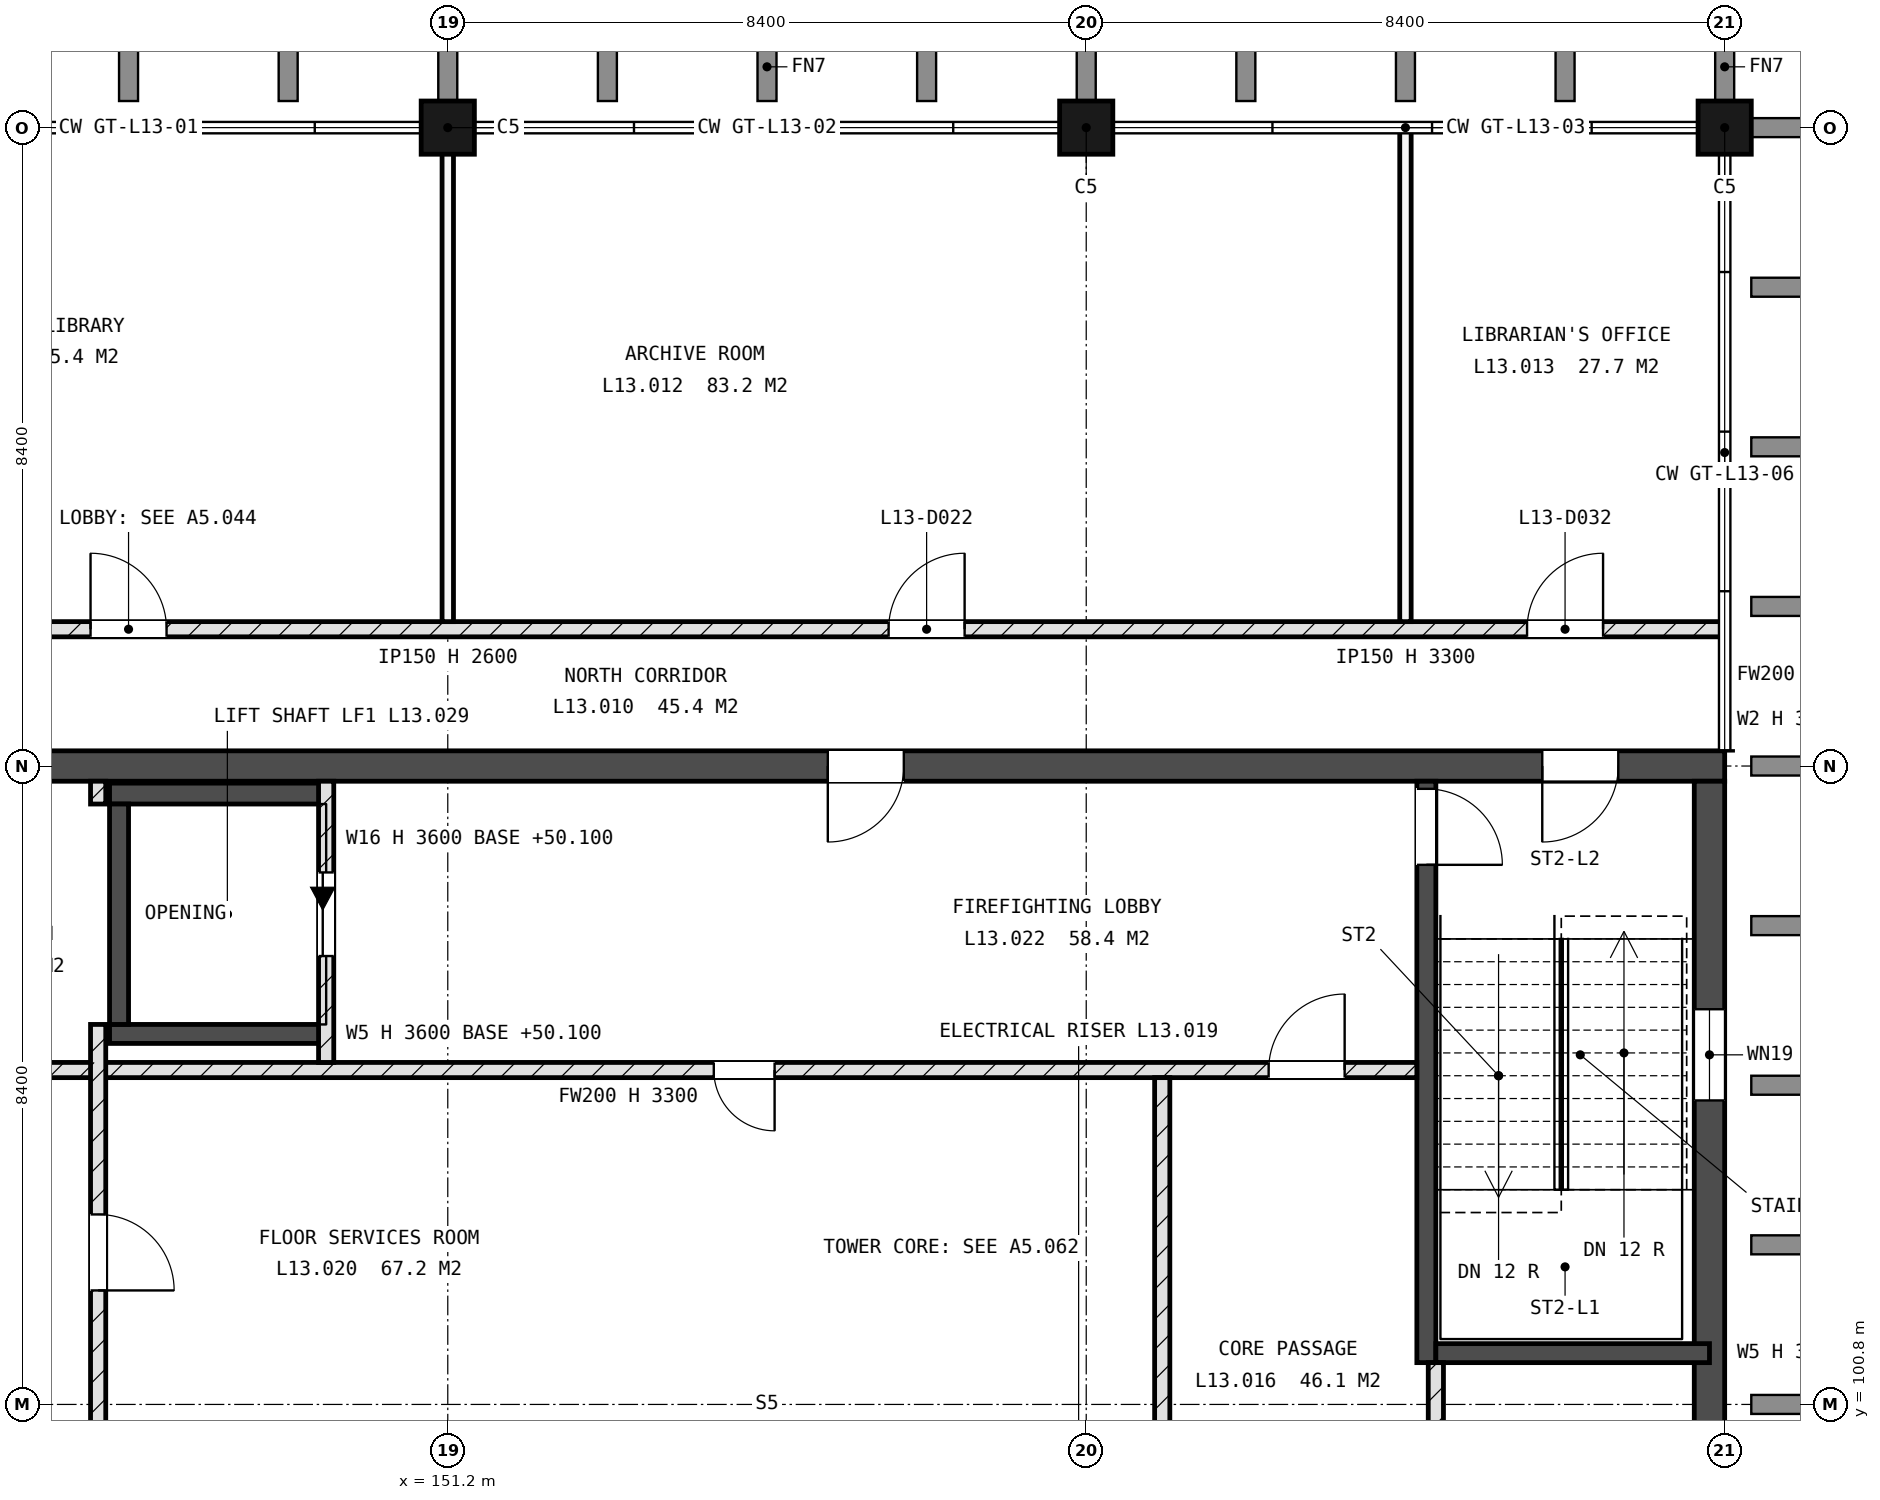
"""IFC4 building model, lengths in metres.
Left out: names, types, materials, properties, quantities, classifications, styles, units other than length and angle.
Written with IfcOpenShell. Run it as: python <this file> out.ifc"""

import sys

from ifc_helpers import new_model, si_unit, direction, frame, frame_2d, origin, origin_2d, place, context, subcontext, project, spatial, rectangle, extrude, element, fill, save


model = new_model("IFC4")
c1 = context("Model", 3, precision=1e-05, world=origin(), true_north=direction((0.0, 1.0)))
c2 = subcontext(c1, "Body", "Model", "MODEL_VIEW")
j1 = project(units=[si_unit("LENGTHUNIT", "METRE"), si_unit("PLANEANGLEUNIT", "RADIAN")], contexts=[c1])
p1 = place(None, origin())
s1 = spatial("IfcSite", under=j1, at=p1, CompositionType="ELEMENT")
p2 = place(p1, origin())
s2 = spatial("IfcBuilding", under=s1, at=p2, CompositionType="ELEMENT")
p3 = place(p2, frame((0.0, 0.0, 50.4)))
s3 = spatial("IfcBuildingStorey", under=s2, at=p3, CompositionType="ELEMENT", Elevation=50.4)
for number, where, z_axis, x_axis in (
    (1, (151.2, 117.6, -0.3), (0.0, 0.0, 1.0), (1.0, 0.0, 0.0)),
    (2, (159.6, 117.6, -0.3), (0.0, 0.0, 1.0), (1.0, 0.0, 0.0)),
    (3, (168.0, 117.6, -0.3), (0.0, 0.0, 1.0), (1.0, 0.0, 0.0)),
):
    element("IfcColumn", number, at=place(p3, frame(where, z_axis=z_axis, x_axis=x_axis)), inside=s3, PredefinedType="COLUMN", context=c2, shape_type="SweptSolid", body=[
        extrude(rectangle(XDim=0.7, YDim=0.7, at=origin_2d()), origin(), (0.0, 0.0, 1.0), 3.6),
    ])
p4 = place(p3, frame((142.8, 109.2, -0.3), z_axis=(0.0, 0.0, 1.0), x_axis=(1.0, 0.0, 0.0)))
e4 = element("IfcWall", 4, at=p4, inside=s3, PredefinedType="SHEAR", context=c2, shape_type="SweptSolid", body=[
    extrude(rectangle(XDim=25.2, YDim=0.4, at=frame_2d((12.6, 0.0))), origin(), (0.0, 0.0, 1.0), 3.6),
])
p5 = place(p4, frame((22.8, 0.0, 0.3)))
e5 = element("IfcOpeningElement", 5, at=p5, cuts=e4, PredefinedType="OPENING", context=c2, shape_type="SweptSolid", body=[
    extrude(rectangle(XDim=1.0, YDim=2.1, at=frame_2d((0.5, 1.05))), frame((0.0, 0.21, 0.0), z_axis=(0.0, -1.0, 0.0), x_axis=(1.0, 0.0, 0.0)), (0.0, 0.0, 1.0), 0.42),
])
p6 = place(p4, frame((1.5, 0.0, 0.3)))
e6 = element("IfcOpeningElement", 6, at=p6, cuts=e4, PredefinedType="OPENING", context=c2, shape_type="SweptSolid", body=[
    extrude(rectangle(XDim=0.8, YDim=2.1, at=frame_2d((0.4, 1.05))), frame((0.0, 0.21, 0.0), z_axis=(0.0, -1.0, 0.0), x_axis=(1.0, 0.0, 0.0)), (0.0, 0.0, 1.0), 0.42),
])
p7 = place(p4, frame((13.4, 0.0, 0.3)))
e7 = element("IfcOpeningElement", 7, at=p7, cuts=e4, PredefinedType="OPENING", context=c2, shape_type="SweptSolid", body=[
    extrude(rectangle(XDim=1.0, YDim=2.1, at=frame_2d((0.5, 1.05))), frame((0.0, 0.21, 0.0), z_axis=(0.0, -1.0, 0.0), x_axis=(1.0, 0.0, 0.0)), (0.0, 0.0, 1.0), 0.42),
])
p8 = place(p3, frame((167.8, 92.6, -0.3), z_axis=(0.0, 0.0, 1.0), x_axis=(0.0, 1.0, 0.0)))
e8 = element("IfcWall", 8, at=p8, inside=s3, PredefinedType="SHEAR", context=c2, shape_type="SweptSolid", body=[
    extrude(rectangle(XDim=16.4, YDim=0.4, at=frame_2d((8.2, 0.0))), origin(), (0.0, 0.0, 1.0), 3.6),
])
p9 = place(p8, frame((12.2, 0.0, 1.9)))
e9 = element("IfcOpeningElement", 9, at=p9, cuts=e8, PredefinedType="OPENING", context=c2, shape_type="SweptSolid", body=[
    extrude(rectangle(XDim=1.2, YDim=0.9, at=frame_2d((0.6, 0.45))), frame((0.0, 0.21, 0.0), z_axis=(0.0, -1.0, 0.0), x_axis=(1.0, 0.0, 0.0)), (0.0, 0.0, 1.0), 0.42),
])
p10 = place(p3, frame((164.075, 101.35, -0.3), z_axis=(0.0, 0.0, 1.0), x_axis=(0.0, 1.0, 0.0)))
e10 = element("IfcWall", 10, at=p10, inside=s3, PredefinedType="SHEAR", context=c2, shape_type="SweptSolid", body=[
    extrude(rectangle(XDim=7.65, YDim=0.25, at=frame_2d((3.825, 0.0))), origin(), (0.0, 0.0, 1.0), 3.6),
])
p11 = place(p10, frame((6.55, 0.0, 0.3)))
e11 = element("IfcOpeningElement", 11, at=p11, cuts=e10, PredefinedType="OPENING", context=c2, shape_type="SweptSolid", body=[
    extrude(rectangle(XDim=1.0, YDim=2.1, at=frame_2d((0.5, 1.05))), frame((0.0, 0.135, 0.0), z_axis=(0.0, -1.0, 0.0), x_axis=(1.0, 0.0, 0.0)), (0.0, 0.0, 1.0), 0.27),
])
p12 = place(p3, frame((164.2, 101.475, -0.3), z_axis=(0.0, 0.0, 1.0), x_axis=(1.0, 0.0, 0.0)))
e12 = element("IfcWall", 12, at=p12, inside=s3, PredefinedType="SHEAR", context=c2, shape_type="SweptSolid", body=[
    extrude(rectangle(XDim=3.6, YDim=0.25, at=frame_2d((1.8, 0.0))), origin(), (0.0, 0.0, 1.0), 3.6),
])
p13 = place(p3, frame((146.75, 105.675, -0.3), z_axis=(0.0, 0.0, 1.0), x_axis=(1.0, 0.0, 0.0)))
e13 = element("IfcWall", 13, at=p13, inside=s3, PredefinedType="SHEAR", context=c2, shape_type="SweptSolid", body=[
    extrude(rectangle(XDim=2.85, YDim=0.25, at=frame_2d((1.425, 0.0))), origin(), (0.0, 0.0, 1.0), 3.6),
])
p14 = place(p3, frame((146.75, 108.837, -0.3), z_axis=(0.0, 0.0, 1.0), x_axis=(1.0, 0.0, 0.0)))
e14 = element("IfcWall", 14, at=p14, inside=s3, PredefinedType="SHEAR", context=c2, shape_type="SweptSolid", body=[
    extrude(rectangle(XDim=2.85, YDim=0.275, at=frame_2d((1.425, 0.0))), origin(), (0.0, 0.0, 1.0), 3.6),
])
p15 = place(p3, frame((146.875, 105.8, -0.3), z_axis=(0.0, 0.0, 1.0), x_axis=(0.0, 1.0, 0.0)))
e15 = element("IfcWall", 15, at=p15, inside=s3, PredefinedType="SHEAR", context=c2, shape_type="SweptSolid", body=[
    extrude(rectangle(XDim=2.9, YDim=0.25, at=frame_2d((1.45, 0.0))), origin(), (0.0, 0.0, 1.0), 3.6),
])
p16 = place(p3, frame((143.2, 105.2, 0.0), z_axis=(0.0, 0.0, 1.0), x_axis=(1.0, 0.0, 0.0)))
e16 = element("IfcWall", 16, at=p16, inside=s3, PredefinedType="SOLIDWALL", context=c2, shape_type="SweptSolid", body=[
    extrude(rectangle(XDim=20.75, YDim=0.2, at=frame_2d((10.375, 0.0))), origin(), (0.0, 0.0, 1.0), 3.3),
])
p17 = place(p16, frame((11.5, 0.0, 0.0)))
e17 = element("IfcOpeningElement", 17, at=p17, cuts=e16, PredefinedType="OPENING", context=c2, shape_type="SweptSolid", body=[
    extrude(rectangle(XDim=0.8, YDim=2.1, at=frame_2d((0.4, 1.05))), frame((0.0, 0.11, 0.0), z_axis=(0.0, -1.0, 0.0), x_axis=(1.0, 0.0, 0.0)), (0.0, 0.0, 1.0), 0.22),
])
p18 = place(p16, frame((18.8, 0.0, 0.0)))
e18 = element("IfcOpeningElement", 18, at=p18, cuts=e16, PredefinedType="OPENING", context=c2, shape_type="SweptSolid", body=[
    extrude(rectangle(XDim=1.0, YDim=2.1, at=frame_2d((0.5, 1.05))), frame((0.0, 0.11, 0.0), z_axis=(0.0, -1.0, 0.0), x_axis=(1.0, 0.0, 0.0)), (0.0, 0.0, 1.0), 0.22),
])
p19 = place(p3, frame((142.8, 111.0, 0.0), z_axis=(0.0, 0.0, 1.0), x_axis=(1.0, 0.0, 0.0)))
e19 = element("IfcWall", 19, at=p19, inside=s3, PredefinedType="SOLIDWALL", context=c2, shape_type="SweptSolid", body=[
    extrude(rectangle(XDim=25.2, YDim=0.2, at=frame_2d((12.6, 0.0))), origin(), (0.0, 0.0, 1.0), 3.3),
])
p20 = place(p19, frame((3.7, 0.0, 0.0)))
e20 = element("IfcOpeningElement", 20, at=p20, cuts=e19, PredefinedType="OPENING", context=c2, shape_type="SweptSolid", body=[
    extrude(rectangle(XDim=1.0, YDim=2.1, at=frame_2d((0.5, 1.05))), frame((0.0, 0.11, 0.0), z_axis=(0.0, -1.0, 0.0), x_axis=(1.0, 0.0, 0.0)), (0.0, 0.0, 1.0), 0.22),
])
p21 = place(p19, frame((14.2, 0.0, 0.0)))
e21 = element("IfcOpeningElement", 21, at=p21, cuts=e19, PredefinedType="OPENING", context=c2, shape_type="SweptSolid", body=[
    extrude(rectangle(XDim=1.0, YDim=2.1, at=frame_2d((0.5, 1.05))), frame((0.0, 0.11, 0.0), z_axis=(0.0, -1.0, 0.0), x_axis=(1.0, 0.0, 0.0)), (0.0, 0.0, 1.0), 0.22),
])
p22 = place(p19, frame((22.6, 0.0, 0.0)))
e22 = element("IfcOpeningElement", 22, at=p22, cuts=e19, PredefinedType="OPENING", context=c2, shape_type="SweptSolid", body=[
    extrude(rectangle(XDim=1.0, YDim=2.1, at=frame_2d((0.5, 1.05))), frame((0.0, 0.11, 0.0), z_axis=(0.0, -1.0, 0.0), x_axis=(1.0, 0.0, 0.0)), (0.0, 0.0, 1.0), 0.22),
])
p23 = place(p3, frame((146.6, 100.5, 0.0), z_axis=(0.0, 0.0, 1.0), x_axis=(0.0, 1.0, 0.0)))
e23 = element("IfcWall", 23, at=p23, inside=s3, PredefinedType="SOLIDWALL", context=c2, shape_type="SweptSolid", body=[
    extrude(rectangle(XDim=5.3, YDim=0.2, at=frame_2d((2.65, 0.0))), origin(), (0.0, 0.0, 1.0), 3.3),
])
p24 = place(p23, frame((1.8, 0.0, 0.0)))
e24 = element("IfcOpeningElement", 24, at=p24, cuts=e23, PredefinedType="OPENING", context=c2, shape_type="SweptSolid", body=[
    extrude(rectangle(XDim=1.0, YDim=2.1, at=frame_2d((0.5, 1.05))), frame((0.0, 0.11, 0.0), z_axis=(0.0, -1.0, 0.0), x_axis=(1.0, 0.0, 0.0)), (0.0, 0.0, 1.0), 0.22),
])
p25 = place(p3, frame((146.6, 108.7, 0.0), z_axis=(0.0, 0.0, 1.0), x_axis=(0.0, 1.0, 0.0)))
e25 = element("IfcWall", 25, at=p25, inside=s3, PredefinedType="SOLIDWALL", context=c2, shape_type="SweptSolid", body=[
    extrude(rectangle(XDim=0.3, YDim=0.2, at=frame_2d((0.15, 0.0))), origin(), (0.0, 0.0, 1.0), 3.3),
])
p26 = place(p3, frame((149.6, 105.3, 0.0), z_axis=(0.0, 0.0, 1.0), x_axis=(0.0, 1.0, 0.0)))
e26 = element("IfcWall", 26, at=p26, inside=s3, PredefinedType="SOLIDWALL", context=c2, shape_type="SweptSolid", body=[
    extrude(rectangle(XDim=3.7, YDim=0.2, at=frame_2d((1.85, 0.0))), origin(), (0.0, 0.0, 1.0), 3.3),
])
p27 = place(p26, frame((1.4, 0.0, 0.0)))
e27 = element("IfcOpeningElement", 27, at=p27, cuts=e26, PredefinedType="OPENING", context=c2, shape_type="SweptSolid", body=[
    extrude(rectangle(XDim=1.1, YDim=2.1, at=frame_2d((0.55, 1.05))), frame((0.0, 0.11, 0.0), z_axis=(0.0, -1.0, 0.0), x_axis=(1.0, 0.0, 0.0)), (0.0, 0.0, 1.0), 0.22),
])
p28 = place(p3, frame((151.2, 111.1, 0.0), z_axis=(0.0, 0.0, 1.0), x_axis=(0.0, 1.0, 0.0)))
e28 = element("IfcWall", 28, at=p28, inside=s3, PredefinedType="PARTITIONING", context=c2, shape_type="SweptSolid", body=[
    extrude(rectangle(XDim=6.5, YDim=0.15, at=frame_2d((3.25, 0.0))), origin(), (0.0, 0.0, 1.0), 2.6),
])
p29 = place(p3, frame((160.6, 92.6, 0.0), z_axis=(0.0, 0.0, 1.0), x_axis=(0.0, 1.0, 0.0)))
e29 = element("IfcWall", 29, at=p29, inside=s3, PredefinedType="SOLIDWALL", context=c2, shape_type="SweptSolid", body=[
    extrude(rectangle(XDim=12.5, YDim=0.2, at=frame_2d((6.25, 0.0))), origin(), (0.0, 0.0, 1.0), 3.3),
])
p30 = place(p29, frame((5.1, 0.0, 0.0)))
e30 = element("IfcOpeningElement", 30, at=p30, cuts=e29, PredefinedType="OPENING", context=c2, shape_type="SweptSolid", body=[
    extrude(rectangle(XDim=0.8, YDim=2.1, at=frame_2d((0.4, 1.05))), frame((0.0, 0.11, 0.0), z_axis=(0.0, -1.0, 0.0), x_axis=(1.0, 0.0, 0.0)), (0.0, 0.0, 1.0), 0.22),
])
p31 = place(p29, frame((0.8, 0.0, 0.0)))
e31 = element("IfcOpeningElement", 31, at=p31, cuts=e29, PredefinedType="OPENING", context=c2, shape_type="SweptSolid", body=[
    extrude(rectangle(XDim=1.0, YDim=2.1, at=frame_2d((0.5, 1.05))), frame((0.0, 0.11, 0.0), z_axis=(0.0, -1.0, 0.0), x_axis=(1.0, 0.0, 0.0)), (0.0, 0.0, 1.0), 0.22),
])
p32 = place(p3, frame((163.8, 111.1, 0.0), z_axis=(0.0, 0.0, 1.0), x_axis=(0.0, 1.0, 0.0)))
e32 = element("IfcWall", 32, at=p32, inside=s3, PredefinedType="PARTITIONING", context=c2, shape_type="SweptSolid", body=[
    extrude(rectangle(XDim=6.5, YDim=0.15, at=frame_2d((3.25, 0.0))), origin(), (0.0, 0.0, 1.0), 3.3),
])
p33 = place(p3, frame((164.2, 92.6, 0.0), z_axis=(0.0, 0.0, 1.0), x_axis=(0.0, 1.0, 0.0)))
e33 = element("IfcWall", 33, at=p33, inside=s3, PredefinedType="SOLIDWALL", context=c2, shape_type="SweptSolid", body=[
    extrude(rectangle(XDim=8.75, YDim=0.2, at=frame_2d((4.375, 0.0))), origin(), (0.0, 0.0, 1.0), 3.3),
])
p34 = place(p33, frame((1.7, 0.0, 0.0)))
e34 = element("IfcOpeningElement", 34, at=p34, cuts=e33, PredefinedType="OPENING", context=c2, shape_type="SweptSolid", body=[
    extrude(rectangle(XDim=0.8, YDim=2.1, at=frame_2d((0.4, 1.05))), frame((0.0, 0.11, 0.0), z_axis=(0.0, -1.0, 0.0), x_axis=(1.0, 0.0, 0.0)), (0.0, 0.0, 1.0), 0.22),
])
p35 = place(p33, frame((6.3, 0.0, 0.0)))
e35 = element("IfcOpeningElement", 35, at=p35, cuts=e33, PredefinedType="OPENING", context=c2, shape_type="SweptSolid", body=[
    extrude(rectangle(XDim=0.8, YDim=2.1, at=frame_2d((0.4, 1.05))), frame((0.0, 0.11, 0.0), z_axis=(0.0, -1.0, 0.0), x_axis=(1.0, 0.0, 0.0)), (0.0, 0.0, 1.0), 0.22),
])
p36 = place(p9, origin())
e36 = element("IfcWindow", 36, at=p36, inside=s3, PartitioningType="SINGLE_PANEL", PredefinedType="WINDOW", context=c2, shape_type="SweptSolid", body=[
    extrude(rectangle(XDim=1.2, YDim=0.9, at=frame_2d((0.6, 0.45))), frame((0.0, 0.03, 0.0), z_axis=(0.0, -1.0, 0.0), x_axis=(1.0, 0.0, 0.0)), (0.0, 0.0, 1.0), 0.06),
])
fill(e9, e36)
p37 = place(p27, origin())
e37 = element("IfcDoor", 37, at=p37, inside=s3, OperationType="SLIDING_TO_LEFT", PredefinedType="DOOR", context=c2, shape_type="SweptSolid", body=[
    extrude(rectangle(XDim=1.1, YDim=2.1, at=frame_2d((0.55, 1.05))), frame((0.0, 0.025, 0.0), z_axis=(0.0, -1.0, 0.0), x_axis=(1.0, 0.0, 0.0)), (0.0, 0.0, 1.0), 0.05),
])
fill(e27, e37)
p38 = place(p11, origin())
e38 = element("IfcDoor", 38, at=p38, inside=s3, OperationType="SINGLE_SWING_LEFT", PredefinedType="DOOR", context=c2, shape_type="SweptSolid", body=[
    extrude(rectangle(XDim=1.0, YDim=2.1, at=frame_2d((0.5, 1.05))), frame((0.0, 0.025, 0.0), z_axis=(0.0, -1.0, 0.0), x_axis=(1.0, 0.0, 0.0)), (0.0, 0.0, 1.0), 0.05),
])
fill(e11, e38)
p39 = place(p5, origin())
e39 = element("IfcDoor", 39, at=p39, inside=s3, OperationType="SINGLE_SWING_LEFT", PredefinedType="DOOR", context=c2, shape_type="SweptSolid", body=[
    extrude(rectangle(XDim=1.0, YDim=2.1, at=frame_2d((0.5, 1.05))), frame((0.0, 0.025, 0.0), z_axis=(0.0, -1.0, 0.0), x_axis=(1.0, 0.0, 0.0)), (0.0, 0.0, 1.0), 0.05),
])
fill(e5, e39)
p40 = place(p20, origin())
e40 = element("IfcDoor", 40, at=p40, inside=s3, OperationType="SINGLE_SWING_RIGHT", PredefinedType="DOOR", context=c2, shape_type="SweptSolid", body=[
    extrude(rectangle(XDim=1.0, YDim=2.1, at=frame_2d((0.5, 1.05))), frame((0.0, 0.025, 0.0), z_axis=(0.0, -1.0, 0.0), x_axis=(1.0, 0.0, 0.0)), (0.0, 0.0, 1.0), 0.05),
])
fill(e20, e40)
p41 = place(p21, origin())
e41 = element("IfcDoor", 41, at=p41, inside=s3, OperationType="SINGLE_SWING_LEFT", PredefinedType="DOOR", context=c2, shape_type="SweptSolid", body=[
    extrude(rectangle(XDim=1.0, YDim=2.1, at=frame_2d((0.5, 1.05))), frame((0.0, 0.025, 0.0), z_axis=(0.0, -1.0, 0.0), x_axis=(1.0, 0.0, 0.0)), (0.0, 0.0, 1.0), 0.05),
])
fill(e21, e41)
p42 = place(p22, origin())
e42 = element("IfcDoor", 42, at=p42, inside=s3, OperationType="SINGLE_SWING_LEFT", PredefinedType="DOOR", context=c2, shape_type="SweptSolid", body=[
    extrude(rectangle(XDim=1.0, YDim=2.1, at=frame_2d((0.5, 1.05))), frame((0.0, 0.025, 0.0), z_axis=(0.0, -1.0, 0.0), x_axis=(1.0, 0.0, 0.0)), (0.0, 0.0, 1.0), 0.05),
])
fill(e22, e42)
p43 = place(p17, origin())
e43 = element("IfcDoor", 43, at=p43, inside=s3, OperationType="SINGLE_SWING_RIGHT", PredefinedType="DOOR", context=c2, shape_type="SweptSolid", body=[
    extrude(rectangle(XDim=0.8, YDim=2.1, at=frame_2d((0.4, 1.05))), frame((0.0, 0.025, 0.0), z_axis=(0.0, -1.0, 0.0), x_axis=(1.0, 0.0, 0.0)), (0.0, 0.0, 1.0), 0.05),
])
fill(e17, e43)
p44 = place(p24, origin())
e44 = element("IfcDoor", 44, at=p44, inside=s3, OperationType="SINGLE_SWING_LEFT", PredefinedType="DOOR", context=c2, shape_type="SweptSolid", body=[
    extrude(rectangle(XDim=1.0, YDim=2.1, at=frame_2d((0.5, 1.05))), frame((0.0, 0.025, 0.0), z_axis=(0.0, -1.0, 0.0), x_axis=(1.0, 0.0, 0.0)), (0.0, 0.0, 1.0), 0.05),
])
fill(e24, e44)
p45 = place(p7, origin())
e45 = element("IfcDoor", 45, at=p45, inside=s3, OperationType="SINGLE_SWING_LEFT", PredefinedType="DOOR", context=c2, shape_type="SweptSolid", body=[
    extrude(rectangle(XDim=1.0, YDim=2.1, at=frame_2d((0.5, 1.05))), frame((0.0, 0.025, 0.0), z_axis=(0.0, -1.0, 0.0), x_axis=(1.0, 0.0, 0.0)), (0.0, 0.0, 1.0), 0.05),
])
fill(e7, e45)
p46 = place(p18, origin())
e46 = element("IfcDoor", 46, at=p46, inside=s3, OperationType="SINGLE_SWING_LEFT", PredefinedType="DOOR", context=c2, shape_type="SweptSolid", body=[
    extrude(rectangle(XDim=1.0, YDim=2.1, at=frame_2d((0.5, 1.05))), frame((0.0, 0.025, 0.0), z_axis=(0.0, -1.0, 0.0), x_axis=(1.0, 0.0, 0.0)), (0.0, 0.0, 1.0), 0.05),
])
fill(e18, e46)
save(model, sys.argv[1])
